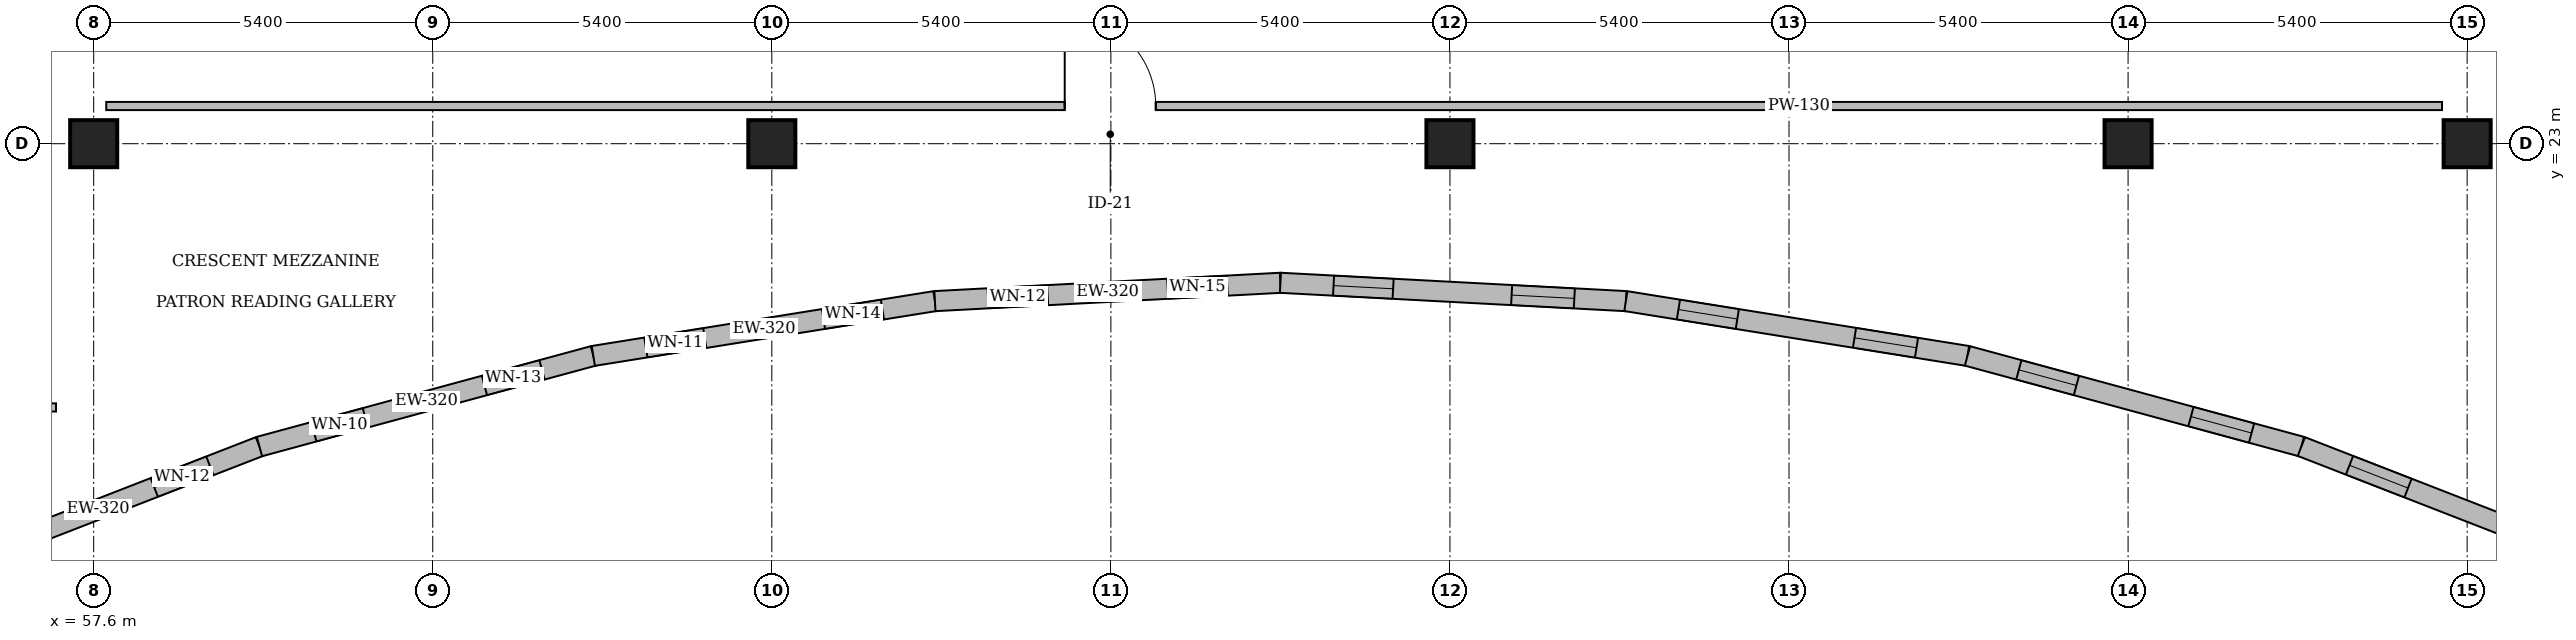
"""IFC4 building model, lengths in metres.
Left out: names, types, materials, properties, quantities, classifications, styles, units other than length and angle.
Written with IfcOpenShell. Run it as: python <this file> out.ifc"""

import sys

from ifc_helpers import new_model, si_unit, direction, frame, frame_2d, origin, origin_2d, place, context, subcontext, project, spatial, rectangle, circle, extrude, element, fill, save


model = new_model("IFC4")
c1 = context("Model", 3, precision=1e-05, world=origin(), true_north=direction((0.0, 1.0)))
c2 = subcontext(c1, "Body", "Model", "MODEL_VIEW")
j1 = project(units=[si_unit("LENGTHUNIT", "METRE"), si_unit("PLANEANGLEUNIT", "RADIAN")], contexts=[c1])
p1 = place(None, origin())
s1 = spatial("IfcSite", under=j1, at=p1, CompositionType="ELEMENT")
p2 = place(p1, origin())
s2 = spatial("IfcBuilding", under=s1, at=p2, CompositionType="ELEMENT")
p3 = place(p2, frame((0.0, 0.0, 4.8)))
s3 = spatial("IfcBuildingStorey", under=s2, at=p3, CompositionType="ELEMENT", Elevation=4.8)
for number, where, z_axis, x_axis in (
    (1, (68.4, 23.0, 0.0), (0.0, 0.0, 1.0), (1.0, 0.0, 0.0)),
    (2, (79.2, 23.0, 0.0), (0.0, 0.0, 1.0), (1.0, 0.0, 0.0)),
    (3, (90.0, 23.0, 0.0), (0.0, 0.0, 1.0), (1.0, 0.0, 0.0)),
    (4, (95.4, 23.0, 0.0), (0.0, 0.0, 1.0), (1.0, 0.0, 0.0)),
    (5, (57.6, 23.0, 0.0), (0.0, 0.0, 1.0), (1.0, 0.0, 0.0)),
):
    element("IfcColumn", number, at=place(p3, frame(where, z_axis=z_axis, x_axis=x_axis)), inside=s3, PredefinedType="COLUMN", context=c2, shape_type="SweptSolid", body=[
        extrude(circle(Radius=0.375, at=origin_2d()), origin(), (0.0, 0.0, 1.0), 4.2),
    ])
p4 = place(p3, frame((55.105, 16.18, 0.0), z_axis=(0.0, 0.0, 1.0), x_axis=(0.931946449517, 0.362595939349, 0.0)))
e6 = element("IfcWall", 6, at=p4, inside=s3, PredefinedType="SOLIDWALL", context=c2, shape_type="SweptSolid", body=[
    extrude(rectangle(XDim=5.51, YDim=0.32, at=frame_2d((2.755, 0.0))), origin(), (0.0, 0.0, 1.0), 4.2),
])
p5 = place(p4, frame((0.897, 0.0, 0.78)))
e7 = element("IfcOpeningElement", 7, at=p5, cuts=e6, PredefinedType="OPENING", context=c2, shape_type="SweptSolid", body=[
    extrude(rectangle(XDim=0.85, YDim=2.25, at=frame_2d((0.425, 1.125))), frame((0.0, 0.18, 0.0), z_axis=(0.0, -1.0, 0.0), x_axis=(1.0, 0.0, 0.0)), (0.0, 0.0, 1.0), 0.36),
])
p6 = place(p4, frame((3.712, 0.0, 0.78)))
e8 = element("IfcOpeningElement", 8, at=p6, cuts=e6, PredefinedType="OPENING", context=c2, shape_type="SweptSolid", body=[
    extrude(rectangle(XDim=0.95, YDim=2.0, at=frame_2d((0.475, 1.0))), frame((0.0, 0.18, 0.0), z_axis=(0.0, -1.0, 0.0), x_axis=(1.0, 0.0, 0.0)), (0.0, 0.0, 1.0), 0.36),
])
p7 = place(p3, frame((60.24, 18.177, 0.0), z_axis=(0.0, 0.0, 1.0), x_axis=(0.965092315166, 0.261909952479, 0.0)))
e9 = element("IfcWall", 9, at=p7, inside=s3, PredefinedType="SOLIDWALL", context=c2, shape_type="SweptSolid", body=[
    extrude(rectangle(XDim=5.51, YDim=0.32, at=frame_2d((2.755, 0.0))), origin(), (0.0, 0.0, 1.0), 4.2),
])
p8 = place(p7, frame((0.897, 0.0, 0.927)))
e10 = element("IfcOpeningElement", 10, at=p8, cuts=e9, PredefinedType="OPENING", context=c2, shape_type="SweptSolid", body=[
    extrude(rectangle(XDim=0.85, YDim=2.35, at=frame_2d((0.425, 1.175))), frame((0.0, 0.18, 0.0), z_axis=(0.0, -1.0, 0.0), x_axis=(1.0, 0.0, 0.0)), (0.0, 0.0, 1.0), 0.36),
])
p9 = place(p7, frame((3.712, 0.0, 0.927)))
e11 = element("IfcOpeningElement", 11, at=p9, cuts=e9, PredefinedType="OPENING", context=c2, shape_type="SweptSolid", body=[
    extrude(rectangle(XDim=0.95, YDim=2.1, at=frame_2d((0.475, 1.05))), frame((0.0, 0.18, 0.0), z_axis=(0.0, -1.0, 0.0), x_axis=(1.0, 0.0, 0.0)), (0.0, 0.0, 1.0), 0.36),
])
p10 = place(p3, frame((65.558, 19.621, 0.0), z_axis=(0.0, 0.0, 1.0), x_axis=(0.9873802806, 0.158367236138, 0.0)))
e12 = element("IfcWall", 12, at=p10, inside=s3, PredefinedType="SOLIDWALL", context=c2, shape_type="SweptSolid", body=[
    extrude(rectangle(XDim=5.51, YDim=0.32, at=frame_2d((2.755, 0.0))), origin(), (0.0, 0.0, 1.0), 4.2),
])
p11 = place(p10, frame((0.847, 0.0, 1.046)))
e13 = element("IfcOpeningElement", 13, at=p11, cuts=e12, PredefinedType="OPENING", context=c2, shape_type="SweptSolid", body=[
    extrude(rectangle(XDim=0.95, YDim=1.9, at=frame_2d((0.475, 0.95))), frame((0.0, 0.18, 0.0), z_axis=(0.0, -1.0, 0.0), x_axis=(1.0, 0.0, 0.0)), (0.0, 0.0, 1.0), 0.36),
])
p12 = place(p10, frame((3.712, 0.0, 1.046)))
e14 = element("IfcOpeningElement", 14, at=p12, cuts=e12, PredefinedType="OPENING", context=c2, shape_type="SweptSolid", body=[
    extrude(rectangle(XDim=0.95, YDim=2.2, at=frame_2d((0.475, 1.1))), frame((0.0, 0.18, 0.0), z_axis=(0.0, -1.0, 0.0), x_axis=(1.0, 0.0, 0.0)), (0.0, 0.0, 1.0), 0.36),
])
p13 = place(p3, frame((70.998, 20.493, 0.0), z_axis=(0.0, 0.0, 1.0), x_axis=(0.998597189501, 0.05294953372, 0.0)))
e15 = element("IfcWall", 15, at=p13, inside=s3, PredefinedType="SOLIDWALL", context=c2, shape_type="SweptSolid", body=[
    extrude(rectangle(XDim=5.51, YDim=0.32, at=frame_2d((2.755, 0.0))), origin(), (0.0, 0.0, 1.0), 4.2),
])
p14 = place(p13, frame((0.847, 0.0, 1.112)))
e16 = element("IfcOpeningElement", 16, at=p14, cuts=e15, PredefinedType="OPENING", context=c2, shape_type="SweptSolid", body=[
    extrude(rectangle(XDim=0.95, YDim=2.0, at=frame_2d((0.475, 1.0))), frame((0.0, 0.18, 0.0), z_axis=(0.0, -1.0, 0.0), x_axis=(1.0, 0.0, 0.0)), (0.0, 0.0, 1.0), 0.36),
])
p15 = place(p13, frame((3.712, 0.0, 1.112)))
e17 = element("IfcOpeningElement", 17, at=p15, cuts=e15, PredefinedType="OPENING", context=c2, shape_type="SweptSolid", body=[
    extrude(rectangle(XDim=0.95, YDim=2.3, at=frame_2d((0.475, 1.15))), frame((0.0, 0.18, 0.0), z_axis=(0.0, -1.0, 0.0), x_axis=(1.0, 0.0, 0.0)), (0.0, 0.0, 1.0), 0.36),
])
p16 = place(p3, frame((76.5, 20.785, 0.0), z_axis=(0.0, 0.0, 1.0), x_axis=(0.998597189501, -0.05294953372, 0.0)))
e18 = element("IfcWall", 18, at=p16, inside=s3, PredefinedType="SOLIDWALL", context=c2, shape_type="SweptSolid", body=[
    extrude(rectangle(XDim=5.51, YDim=0.32, at=frame_2d((2.755, 0.0))), origin(), (0.0, 0.0, 1.0), 4.2),
])
p17 = place(p16, frame((0.847, 0.0, 1.112)))
e19 = element("IfcOpeningElement", 19, at=p17, cuts=e18, PredefinedType="OPENING", context=c2, shape_type="SweptSolid", body=[
    extrude(rectangle(XDim=0.95, YDim=2.1, at=frame_2d((0.475, 1.05))), frame((0.0, 0.18, 0.0), z_axis=(0.0, -1.0, 0.0), x_axis=(1.0, 0.0, 0.0)), (0.0, 0.0, 1.0), 0.36),
])
p18 = place(p16, frame((3.688, 0.0, 1.112)))
e20 = element("IfcOpeningElement", 20, at=p18, cuts=e18, PredefinedType="OPENING", context=c2, shape_type="SweptSolid", body=[
    extrude(rectangle(XDim=1.0, YDim=1.95, at=frame_2d((0.5, 0.975))), frame((0.0, 0.18, 0.0), z_axis=(0.0, -1.0, 0.0), x_axis=(1.0, 0.0, 0.0)), (0.0, 0.0, 1.0), 0.36),
])
p19 = place(p3, frame((82.002, 20.493, 0.0), z_axis=(0.0, 0.0, 1.0), x_axis=(0.9873802806, -0.158367236138, 0.0)))
e21 = element("IfcWall", 21, at=p19, inside=s3, PredefinedType="SOLIDWALL", context=c2, shape_type="SweptSolid", body=[
    extrude(rectangle(XDim=5.51, YDim=0.32, at=frame_2d((2.755, 0.0))), origin(), (0.0, 0.0, 1.0), 4.2),
])
p20 = place(p19, frame((0.847, 0.0, 1.046)))
e22 = element("IfcOpeningElement", 22, at=p20, cuts=e21, PredefinedType="OPENING", context=c2, shape_type="SweptSolid", body=[
    extrude(rectangle(XDim=0.95, YDim=2.2, at=frame_2d((0.475, 1.1))), frame((0.0, 0.18, 0.0), z_axis=(0.0, -1.0, 0.0), x_axis=(1.0, 0.0, 0.0)), (0.0, 0.0, 1.0), 0.36),
])
p21 = place(p19, frame((3.688, 0.0, 1.046)))
e23 = element("IfcOpeningElement", 23, at=p21, cuts=e21, PredefinedType="OPENING", context=c2, shape_type="SweptSolid", body=[
    extrude(rectangle(XDim=1.0, YDim=2.05, at=frame_2d((0.5, 1.025))), frame((0.0, 0.18, 0.0), z_axis=(0.0, -1.0, 0.0), x_axis=(1.0, 0.0, 0.0)), (0.0, 0.0, 1.0), 0.36),
])
p22 = place(p3, frame((87.442, 19.621, 0.0), z_axis=(0.0, 0.0, 1.0), x_axis=(0.965092315166, -0.261909952479, 0.0)))
e24 = element("IfcWall", 24, at=p22, inside=s3, PredefinedType="SOLIDWALL", context=c2, shape_type="SweptSolid", body=[
    extrude(rectangle(XDim=5.51, YDim=0.32, at=frame_2d((2.755, 0.0))), origin(), (0.0, 0.0, 1.0), 4.2),
])
p23 = place(p22, frame((0.847, 0.0, 0.927)))
e25 = element("IfcOpeningElement", 25, at=p23, cuts=e24, PredefinedType="OPENING", context=c2, shape_type="SweptSolid", body=[
    extrude(rectangle(XDim=0.95, YDim=2.3, at=frame_2d((0.475, 1.15))), frame((0.0, 0.18, 0.0), z_axis=(0.0, -1.0, 0.0), x_axis=(1.0, 0.0, 0.0)), (0.0, 0.0, 1.0), 0.36),
])
p24 = place(p22, frame((3.688, 0.0, 0.927)))
e26 = element("IfcOpeningElement", 26, at=p24, cuts=e24, PredefinedType="OPENING", context=c2, shape_type="SweptSolid", body=[
    extrude(rectangle(XDim=1.0, YDim=2.15, at=frame_2d((0.5, 1.075))), frame((0.0, 0.18, 0.0), z_axis=(0.0, -1.0, 0.0), x_axis=(1.0, 0.0, 0.0)), (0.0, 0.0, 1.0), 0.36),
])
p25 = place(p3, frame((92.76, 18.177, 0.0), z_axis=(0.0, 0.0, 1.0), x_axis=(0.931946449517, -0.362595939349, 0.0)))
e27 = element("IfcWall", 27, at=p25, inside=s3, PredefinedType="SOLIDWALL", context=c2, shape_type="SweptSolid", body=[
    extrude(rectangle(XDim=5.51, YDim=0.32, at=frame_2d((2.755, 0.0))), origin(), (0.0, 0.0, 1.0), 4.2),
])
p26 = place(p25, frame((0.823, 0.0, 0.78)))
e28 = element("IfcOpeningElement", 28, at=p26, cuts=e27, PredefinedType="OPENING", context=c2, shape_type="SweptSolid", body=[
    extrude(rectangle(XDim=1.0, YDim=1.95, at=frame_2d((0.5, 0.975))), frame((0.0, 0.18, 0.0), z_axis=(0.0, -1.0, 0.0), x_axis=(1.0, 0.0, 0.0)), (0.0, 0.0, 1.0), 0.36),
])
p27 = place(p25, frame((3.688, 0.0, 0.78)))
e29 = element("IfcOpeningElement", 29, at=p27, cuts=e27, PredefinedType="OPENING", context=c2, shape_type="SweptSolid", body=[
    extrude(rectangle(XDim=1.0, YDim=2.25, at=frame_2d((0.5, 1.125))), frame((0.0, 0.18, 0.0), z_axis=(0.0, -1.0, 0.0), x_axis=(1.0, 0.0, 0.0)), (0.0, 0.0, 1.0), 0.36),
])
p28 = place(p3, frame((57.8, 23.6, 0.0), z_axis=(0.0, 0.0, 1.0), x_axis=(1.0, 0.0, 0.0)))
e30 = element("IfcWall", 30, at=p28, inside=s3, PredefinedType="PARTITIONING", context=c2, shape_type="SweptSolid", body=[
    extrude(rectangle(XDim=37.2, YDim=0.13, at=frame_2d((18.6, 0.0))), origin(), (0.0, 0.0, 1.0), 3.94),
])
p29 = place(p28, frame((15.265, 0.0, 0.0)))
e31 = element("IfcOpeningElement", 31, at=p29, cuts=e30, PredefinedType="OPENING", context=c2, shape_type="SweptSolid", body=[
    extrude(rectangle(XDim=1.45, YDim=2.2, at=frame_2d((0.725, 1.1))), frame((0.0, 0.085, 0.0), z_axis=(0.0, -1.0, 0.0), x_axis=(1.0, 0.0, 0.0)), (0.0, 0.0, 1.0), 0.17),
])
p30 = place(p3, frame((37.0, 18.8, 0.0), z_axis=(0.0, 0.0, 1.0), x_axis=(1.0, 0.0, 0.0)))
e32 = element("IfcWall", 32, at=p30, inside=s3, PredefinedType="PARTITIONING", context=c2, shape_type="SweptSolid", body=[
    extrude(rectangle(XDim=20.0, YDim=0.13, at=frame_2d((10.0, 0.0))), origin(), (0.0, 0.0, 1.0), 3.94),
])
p31 = place(p30, frame((17.208, 0.0, 0.0)))
e33 = element("IfcOpeningElement", 33, at=p31, cuts=e32, PredefinedType="OPENING", context=c2, shape_type="SweptSolid", body=[
    extrude(rectangle(XDim=1.45, YDim=2.2, at=frame_2d((0.725, 1.1))), frame((0.0, 0.085, 0.0), z_axis=(0.0, -1.0, 0.0), x_axis=(1.0, 0.0, 0.0)), (0.0, 0.0, 1.0), 0.17),
])
p32 = place(p6, origin())
e34 = element("IfcWindow", 34, at=p32, inside=s3, PartitioningType="SINGLE_PANEL", PredefinedType="WINDOW", context=c2, shape_type="SweptSolid", body=[
    extrude(rectangle(XDim=0.95, YDim=2.0, at=frame_2d((0.475, 1.0))), frame((0.0, 0.03, 0.0), z_axis=(0.0, -1.0, 0.0), x_axis=(1.0, 0.0, 0.0)), (0.0, 0.0, 1.0), 0.06),
])
fill(e8, e34)
p33 = place(p8, origin())
e35 = element("IfcWindow", 35, at=p33, inside=s3, PartitioningType="SINGLE_PANEL", PredefinedType="WINDOW", context=c2, shape_type="SweptSolid", body=[
    extrude(rectangle(XDim=0.85, YDim=2.35, at=frame_2d((0.425, 1.175))), frame((0.0, 0.03, 0.0), z_axis=(0.0, -1.0, 0.0), x_axis=(1.0, 0.0, 0.0)), (0.0, 0.0, 1.0), 0.06),
])
fill(e10, e35)
p34 = place(p9, origin())
e36 = element("IfcWindow", 36, at=p34, inside=s3, PartitioningType="SINGLE_PANEL", PredefinedType="WINDOW", context=c2, shape_type="SweptSolid", body=[
    extrude(rectangle(XDim=0.95, YDim=2.1, at=frame_2d((0.475, 1.05))), frame((0.0, 0.03, 0.0), z_axis=(0.0, -1.0, 0.0), x_axis=(1.0, 0.0, 0.0)), (0.0, 0.0, 1.0), 0.06),
])
fill(e11, e36)
p35 = place(p11, origin())
e37 = element("IfcWindow", 37, at=p35, inside=s3, PartitioningType="SINGLE_PANEL", PredefinedType="WINDOW", context=c2, shape_type="SweptSolid", body=[
    extrude(rectangle(XDim=0.95, YDim=1.9, at=frame_2d((0.475, 0.95))), frame((0.0, 0.03, 0.0), z_axis=(0.0, -1.0, 0.0), x_axis=(1.0, 0.0, 0.0)), (0.0, 0.0, 1.0), 0.06),
])
fill(e13, e37)
p36 = place(p12, origin())
e38 = element("IfcWindow", 38, at=p36, inside=s3, PartitioningType="SINGLE_PANEL", PredefinedType="WINDOW", context=c2, shape_type="SweptSolid", body=[
    extrude(rectangle(XDim=0.95, YDim=2.2, at=frame_2d((0.475, 1.1))), frame((0.0, 0.03, 0.0), z_axis=(0.0, -1.0, 0.0), x_axis=(1.0, 0.0, 0.0)), (0.0, 0.0, 1.0), 0.06),
])
fill(e14, e38)
p37 = place(p14, origin())
e39 = element("IfcWindow", 39, at=p37, inside=s3, PartitioningType="SINGLE_PANEL", PredefinedType="WINDOW", context=c2, shape_type="SweptSolid", body=[
    extrude(rectangle(XDim=0.95, YDim=2.0, at=frame_2d((0.475, 1.0))), frame((0.0, 0.03, 0.0), z_axis=(0.0, -1.0, 0.0), x_axis=(1.0, 0.0, 0.0)), (0.0, 0.0, 1.0), 0.06),
])
fill(e16, e39)
p38 = place(p15, origin())
e40 = element("IfcWindow", 40, at=p38, inside=s3, PartitioningType="SINGLE_PANEL", PredefinedType="WINDOW", context=c2, shape_type="SweptSolid", body=[
    extrude(rectangle(XDim=0.95, YDim=2.3, at=frame_2d((0.475, 1.15))), frame((0.0, 0.03, 0.0), z_axis=(0.0, -1.0, 0.0), x_axis=(1.0, 0.0, 0.0)), (0.0, 0.0, 1.0), 0.06),
])
fill(e17, e40)
p39 = place(p17, origin())
e41 = element("IfcWindow", 41, at=p39, inside=s3, PartitioningType="SINGLE_PANEL", PredefinedType="WINDOW", context=c2, shape_type="SweptSolid", body=[
    extrude(rectangle(XDim=0.95, YDim=2.1, at=frame_2d((0.475, 1.05))), frame((0.0, 0.03, 0.0), z_axis=(0.0, -1.0, 0.0), x_axis=(1.0, 0.0, 0.0)), (0.0, 0.0, 1.0), 0.06),
])
fill(e19, e41)
p40 = place(p18, origin())
e42 = element("IfcWindow", 42, at=p40, inside=s3, PartitioningType="SINGLE_PANEL", PredefinedType="WINDOW", context=c2, shape_type="SweptSolid", body=[
    extrude(rectangle(XDim=1.0, YDim=1.95, at=frame_2d((0.5, 0.975))), frame((0.0, 0.03, 0.0), z_axis=(0.0, -1.0, 0.0), x_axis=(1.0, 0.0, 0.0)), (0.0, 0.0, 1.0), 0.06),
])
fill(e20, e42)
p41 = place(p20, origin())
e43 = element("IfcWindow", 43, at=p41, inside=s3, PartitioningType="SINGLE_PANEL", PredefinedType="WINDOW", context=c2, shape_type="SweptSolid", body=[
    extrude(rectangle(XDim=0.95, YDim=2.2, at=frame_2d((0.475, 1.1))), frame((0.0, 0.03, 0.0), z_axis=(0.0, -1.0, 0.0), x_axis=(1.0, 0.0, 0.0)), (0.0, 0.0, 1.0), 0.06),
])
fill(e22, e43)
p42 = place(p21, origin())
e44 = element("IfcWindow", 44, at=p42, inside=s3, PartitioningType="SINGLE_PANEL", PredefinedType="WINDOW", context=c2, shape_type="SweptSolid", body=[
    extrude(rectangle(XDim=1.0, YDim=2.05, at=frame_2d((0.5, 1.025))), frame((0.0, 0.03, 0.0), z_axis=(0.0, -1.0, 0.0), x_axis=(1.0, 0.0, 0.0)), (0.0, 0.0, 1.0), 0.06),
])
fill(e23, e44)
p43 = place(p23, origin())
e45 = element("IfcWindow", 45, at=p43, inside=s3, PartitioningType="SINGLE_PANEL", PredefinedType="WINDOW", context=c2, shape_type="SweptSolid", body=[
    extrude(rectangle(XDim=0.95, YDim=2.3, at=frame_2d((0.475, 1.15))), frame((0.0, 0.03, 0.0), z_axis=(0.0, -1.0, 0.0), x_axis=(1.0, 0.0, 0.0)), (0.0, 0.0, 1.0), 0.06),
])
fill(e25, e45)
p44 = place(p24, origin())
e46 = element("IfcWindow", 46, at=p44, inside=s3, PartitioningType="SINGLE_PANEL", PredefinedType="WINDOW", context=c2, shape_type="SweptSolid", body=[
    extrude(rectangle(XDim=1.0, YDim=2.15, at=frame_2d((0.5, 1.075))), frame((0.0, 0.03, 0.0), z_axis=(0.0, -1.0, 0.0), x_axis=(1.0, 0.0, 0.0)), (0.0, 0.0, 1.0), 0.06),
])
fill(e26, e46)
p45 = place(p26, origin())
e47 = element("IfcWindow", 47, at=p45, inside=s3, PartitioningType="SINGLE_PANEL", PredefinedType="WINDOW", context=c2, shape_type="SweptSolid", body=[
    extrude(rectangle(XDim=1.0, YDim=1.95, at=frame_2d((0.5, 0.975))), frame((0.0, 0.03, 0.0), z_axis=(0.0, -1.0, 0.0), x_axis=(1.0, 0.0, 0.0)), (0.0, 0.0, 1.0), 0.06),
])
fill(e28, e47)
p46 = place(p29, origin())
e48 = element("IfcDoor", 48, at=p46, inside=s3, OperationType="DOUBLE_DOOR_SINGLE_SWING", PredefinedType="DOOR", context=c2, shape_type="SweptSolid", body=[
    extrude(rectangle(XDim=1.45, YDim=2.2, at=frame_2d((0.725, 1.1))), frame((0.0, 0.025, 0.0), z_axis=(0.0, -1.0, 0.0), x_axis=(1.0, 0.0, 0.0)), (0.0, 0.0, 1.0), 0.05),
])
fill(e31, e48)
save(model, sys.argv[1])
